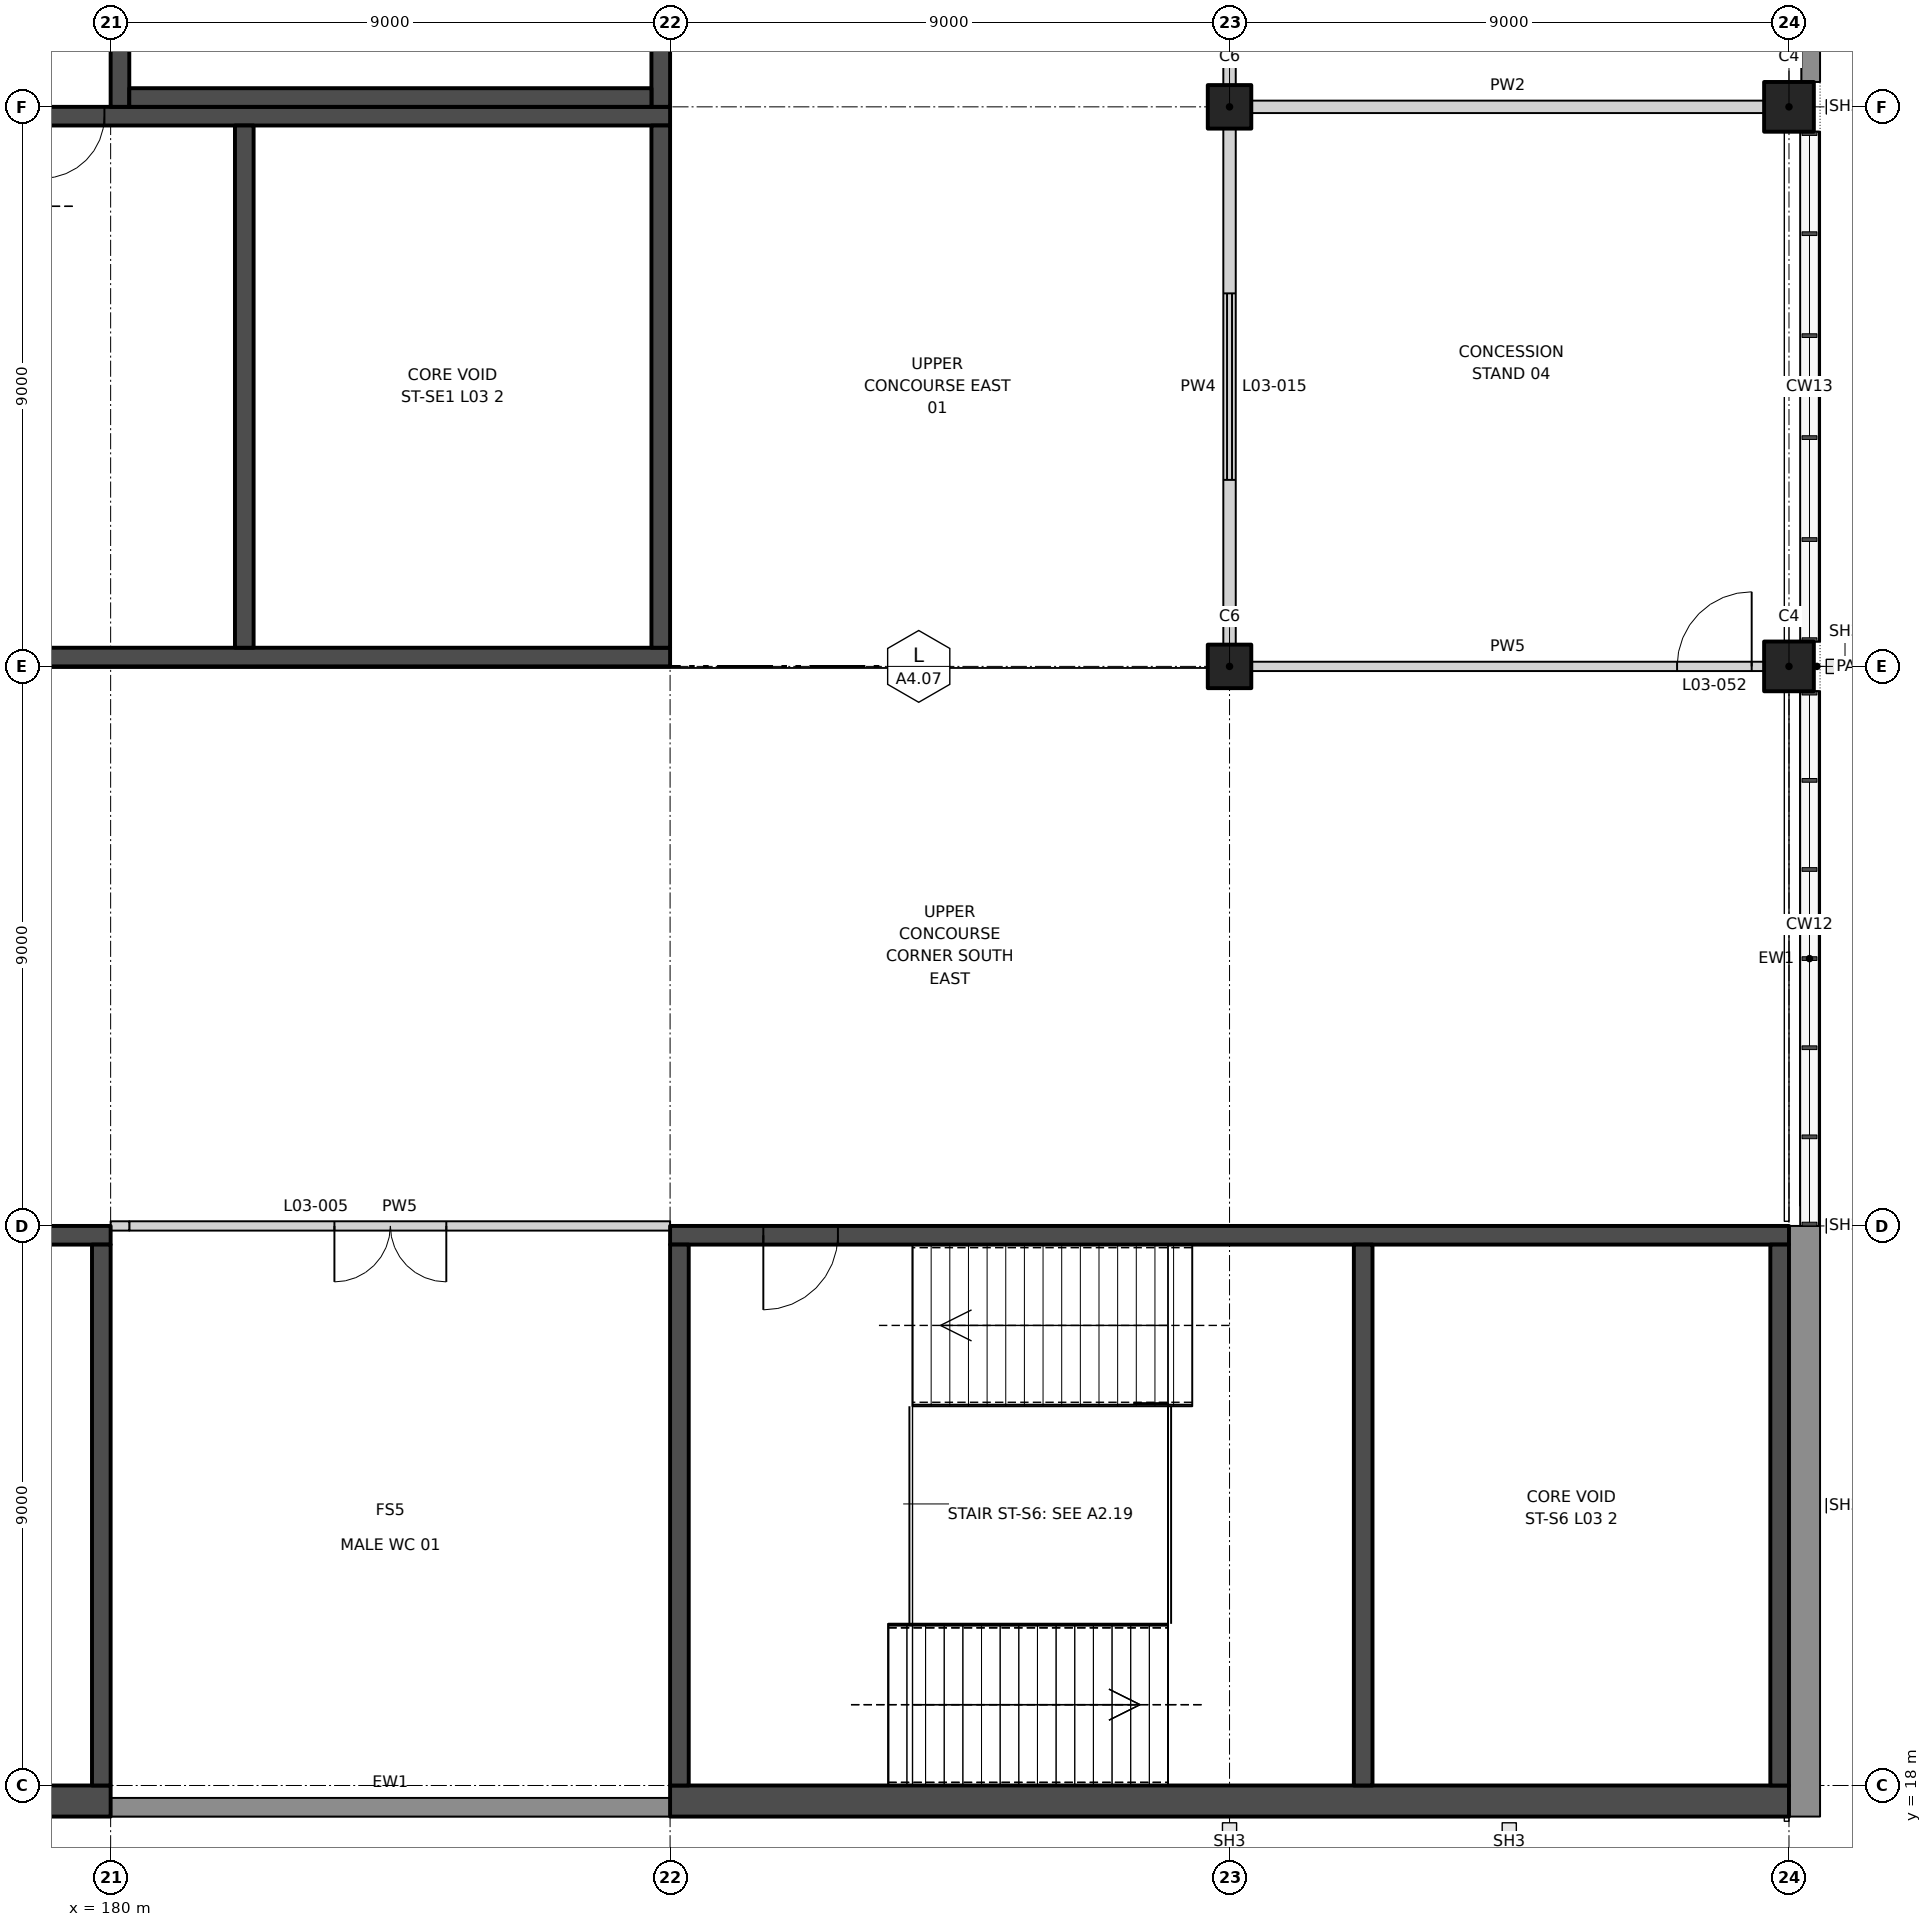
"""IFC4 building model, lengths in metres.
Left out: names, types, materials, properties, quantities, classifications, styles, units other than length and angle.
Written with IfcOpenShell. Run it as: python <this file> out.ifc"""

import sys

from ifc_helpers import new_model, si_unit, direction, frame, frame_2d, origin, origin_2d, place, context, subcontext, project, spatial, rectangle, extrude, element, fill, save


model = new_model("IFC4")
c1 = context("Model", 3, precision=1e-05, world=origin(), true_north=direction((0.0, 1.0)))
c2 = subcontext(c1, "Body", "Model", "MODEL_VIEW")
j1 = project(units=[si_unit("LENGTHUNIT", "METRE"), si_unit("PLANEANGLEUNIT", "RADIAN")], contexts=[c1])
p1 = place(None, origin())
s1 = spatial("IfcSite", under=j1, at=p1, CompositionType="ELEMENT")
p2 = place(p1, origin())
s2 = spatial("IfcBuilding", under=s1, at=p2, CompositionType="ELEMENT")
p3 = place(p2, frame((0.0, 0.0, 22.0)))
s3 = spatial("IfcBuildingStorey", under=s2, at=p3, CompositionType="ELEMENT", Elevation=22.0)
for number, where, z_axis, x_axis in (
    (1, (207.0, 36.0, 0.0), (0.0, 0.0, 1.0), (1.0, 0.0, 0.0)),
    (2, (207.0, 45.0, 0.0), (0.0, 0.0, 1.0), (1.0, 0.0, 0.0)),
):
    element("IfcColumn", number, at=place(p3, frame(where, z_axis=z_axis, x_axis=x_axis)), inside=s3, PredefinedType="COLUMN", context=c2, shape_type="SweptSolid", body=[
        extrude(rectangle(XDim=0.8, YDim=0.8, at=origin_2d()), origin(), (0.0, 0.0, 1.0), 6.0),
    ])
for number, where, z_axis, x_axis in (
    (3, (198.0, 36.0, 0.0), (0.0, 0.0, 1.0), (1.0, 0.0, 0.0)),
    (4, (198.0, 45.0, 0.0), (0.0, 0.0, 1.0), (1.0, 0.0, 0.0)),
):
    element("IfcColumn", number, at=place(p3, frame(where, z_axis=z_axis, x_axis=x_axis)), inside=s3, PredefinedType="COLUMN", context=c2, shape_type="SweptSolid", body=[
        extrude(rectangle(XDim=0.7, YDim=0.7, at=origin_2d()), origin(), (0.0, 0.0, 1.0), 6.0),
    ])
p4 = place(p3, frame((180.3, 27.0, 0.0), z_axis=(0.0, 0.0, 1.0), x_axis=(1.0, 0.0, 0.0)))
e5 = element("IfcWall", 5, at=p4, inside=s3, PredefinedType="PARTITIONING", context=c2, shape_type="SweptSolid", body=[
    extrude(rectangle(XDim=8.7, YDim=0.15, at=frame_2d((4.35, 0.0))), origin(), (0.0, 0.0, 1.0), 4.7),
])
p5 = place(p4, frame((3.3, 0.0, 0.0)))
e6 = element("IfcOpeningElement", 6, at=p5, cuts=e5, PredefinedType="OPENING", context=c2, shape_type="SweptSolid", body=[
    extrude(rectangle(XDim=1.8, YDim=2.1, at=frame_2d((0.9, 1.05))), frame((0.0, 0.085, 0.0), z_axis=(0.0, -1.0, 0.0), x_axis=(1.0, 0.0, 0.0)), (0.0, 0.0, 1.0), 0.17),
])
p6 = place(p3, frame((198.35, 36.0, 0.0), z_axis=(0.0, 0.0, 1.0), x_axis=(1.0, 0.0, 0.0)))
e7 = element("IfcWall", 7, at=p6, inside=s3, PredefinedType="PARTITIONING", context=c2, shape_type="SweptSolid", body=[
    extrude(rectangle(XDim=8.25, YDim=0.15, at=frame_2d((4.125, 0.0))), origin(), (0.0, 0.0, 1.0), 4.8),
])
p7 = place(p6, frame((6.85, 0.0, 0.0)))
e8 = element("IfcOpeningElement", 8, at=p7, cuts=e7, PredefinedType="OPENING", context=c2, shape_type="SweptSolid", body=[
    extrude(rectangle(XDim=1.2, YDim=2.1, at=frame_2d((0.6, 1.05))), frame((0.0, 0.085, 0.0), z_axis=(0.0, -1.0, 0.0), x_axis=(1.0, 0.0, 0.0)), (0.0, 0.0, 1.0), 0.17),
])
p8 = place(p3, frame((198.35, 45.0, 0.0), z_axis=(0.0, 0.0, 1.0), x_axis=(1.0, 0.0, 0.0)))
e9 = element("IfcWall", 9, at=p8, inside=s3, PredefinedType="PARTITIONING", context=c2, shape_type="SweptSolid", body=[
    extrude(rectangle(XDim=8.25, YDim=0.2, at=frame_2d((4.125, 0.0))), origin(), (0.0, 0.0, 1.0), 4.8),
])
p9 = place(p3, frame((198.0, 36.35, 0.0), z_axis=(0.0, 0.0, 1.0), x_axis=(0.0, 1.0, 0.0)))
e10 = element("IfcWall", 10, at=p9, inside=s3, PredefinedType="PARTITIONING", context=c2, shape_type="SweptSolid", body=[
    extrude(rectangle(XDim=8.3, YDim=0.2, at=frame_2d((4.15, 0.0))), origin(), (0.0, 0.0, 1.0), 4.8),
])
p10 = place(p9, frame((2.65, 0.0, 0.0)))
e11 = element("IfcOpeningElement", 11, at=p10, cuts=e10, PredefinedType="OPENING", context=c2, shape_type="SweptSolid", body=[
    extrude(rectangle(XDim=3.0, YDim=2.4, at=frame_2d((1.5, 1.2))), frame((0.0, 0.11, 0.0), z_axis=(0.0, -1.0, 0.0), x_axis=(1.0, 0.0, 0.0)), (0.0, 0.0, 1.0), 0.22),
])
p11 = place(p3, frame((198.0, 45.35, 0.0), z_axis=(0.0, 0.0, 1.0), x_axis=(0.0, 1.0, 0.0)))
e12 = element("IfcWall", 12, at=p11, inside=s3, PredefinedType="PARTITIONING", context=c2, shape_type="SweptSolid", body=[
    extrude(rectangle(XDim=8.65, YDim=0.2, at=frame_2d((4.325, 0.0))), origin(), (0.0, 0.0, 1.0), 4.7),
])
p12 = place(p11, frame((3.425, 0.0, 0.0)))
e13 = element("IfcOpeningElement", 13, at=p12, cuts=e12, PredefinedType="OPENING", context=c2, shape_type="SweptSolid", body=[
    extrude(rectangle(XDim=1.8, YDim=2.1, at=frame_2d((0.9, 1.05))), frame((0.0, 0.11, 0.0), z_axis=(0.0, -1.0, 0.0), x_axis=(1.0, 0.0, 0.0)), (0.0, 0.0, 1.0), 0.22),
])
p13 = place(p3, frame((180.0, 17.65, 0.0), z_axis=(0.0, 0.0, 1.0), x_axis=(1.0, 0.0, 0.0)))
e14 = element("IfcWall", 14, at=p13, inside=s3, PredefinedType="SOLIDWALL", context=c2, shape_type="SweptSolid", body=[
    extrude(rectangle(XDim=9.0, YDim=0.3, at=frame_2d((4.5, 0.0))), origin(), (0.0, 0.0, 1.0), 6.0),
])
p14 = place(p3, frame((207.25, 17.5, 0.0), z_axis=(0.0, 0.0, 1.0), x_axis=(0.0, 1.0, 0.0)))
e15 = element("IfcWall", 15, at=p14, inside=s3, PredefinedType="SOLIDWALL", context=c2, shape_type="SweptSolid", body=[
    extrude(rectangle(XDim=9.5, YDim=0.5, at=frame_2d((4.75, 0.0))), origin(), (0.0, 0.0, 1.0), 6.0),
])
p15 = place(p3, frame((207.35, 27.0, 0.0), z_axis=(0.0, 0.0, 1.0), x_axis=(0.0, 1.0, 0.0)))
e16 = element("IfcWall", 16, at=p15, inside=s3, PredefinedType="SOLIDWALL", context=c2, shape_type="SweptSolid", body=[
    extrude(rectangle(XDim=8.6, YDim=0.3, at=frame_2d((4.3, 0.0))), origin(), (0.0, 0.0, 1.0), 1.0),
])
p16 = place(p3, frame((207.35, 36.4, 0.0), z_axis=(0.0, 0.0, 1.0), x_axis=(0.0, 1.0, 0.0)))
e17 = element("IfcWall", 17, at=p16, inside=s3, PredefinedType="SOLIDWALL", context=c2, shape_type="SweptSolid", body=[
    extrude(rectangle(XDim=8.2, YDim=0.3, at=frame_2d((4.1, 0.0))), origin(), (0.0, 0.0, 1.0), 1.0),
])
p17 = place(p3, frame((207.35, 45.4, 0.0), z_axis=(0.0, 0.0, 1.0), x_axis=(0.0, 1.0, 0.0)))
e18 = element("IfcWall", 18, at=p17, inside=s3, PredefinedType="SOLIDWALL", context=c2, shape_type="SweptSolid", body=[
    extrude(rectangle(XDim=1.85, YDim=0.3, at=frame_2d((0.925, 0.0))), origin(), (0.0, 0.0, 1.0), 5.4),
])
p18 = place(p3, frame((180.0, 26.85, 0.0), z_axis=(0.0, 0.0, 1.0), x_axis=(-1.0, 0.0, 0.0)))
e19 = element("IfcWall", 19, at=p18, inside=s3, PredefinedType="SHEAR", context=c2, shape_type="SweptSolid", body=[
    extrude(rectangle(XDim=18.0, YDim=0.3, at=frame_2d((9.0, 0.0))), origin(), (0.0, 0.0, 1.0), 6.0),
])
p19 = place(p18, frame((1.5, 0.0, 0.0)))
e20 = element("IfcOpeningElement", 20, at=p19, cuts=e19, PredefinedType="OPENING", context=c2, shape_type="SweptSolid", body=[
    extrude(rectangle(XDim=1.2, YDim=2.1, at=frame_2d((0.6, 1.05))), frame((0.0, 0.16, 0.0), z_axis=(0.0, -1.0, 0.0), x_axis=(1.0, 0.0, 0.0)), (0.0, 0.0, 1.0), 0.32),
])
p20 = place(p3, frame((180.0, 17.75, 0.0), z_axis=(0.0, 0.0, 1.0), x_axis=(-1.0, 0.0, 0.0)))
e21 = element("IfcWall", 21, at=p20, inside=s3, PredefinedType="SHEAR", context=c2, shape_type="SweptSolid", body=[
    extrude(rectangle(XDim=18.0, YDim=0.5, at=frame_2d((9.0, 0.0))), origin(), (0.0, 0.0, 1.0), 6.0),
])
p21 = place(p3, frame((179.85, 26.7, 0.0), z_axis=(0.0, 0.0, 1.0), x_axis=(0.0, -1.0, 0.0)))
e22 = element("IfcWall", 22, at=p21, inside=s3, PredefinedType="SHEAR", context=c2, shape_type="SweptSolid", body=[
    extrude(rectangle(XDim=8.7, YDim=0.3, at=frame_2d((4.35, 0.0))), origin(), (0.0, 0.0, 1.0), 6.0),
])
p22 = place(p3, frame((189.0, 26.85, 0.0), z_axis=(0.0, 0.0, 1.0), x_axis=(1.0, 0.0, 0.0)))
e23 = element("IfcWall", 23, at=p22, inside=s3, PredefinedType="SHEAR", context=c2, shape_type="SweptSolid", body=[
    extrude(rectangle(XDim=18.0, YDim=0.3, at=frame_2d((9.0, 0.0))), origin(), (0.0, 0.0, 1.0), 6.0),
])
p23 = place(p22, frame((1.5, 0.0, 0.0)))
e24 = element("IfcOpeningElement", 24, at=p23, cuts=e23, PredefinedType="OPENING", context=c2, shape_type="SweptSolid", body=[
    extrude(rectangle(XDim=1.2, YDim=2.1, at=frame_2d((0.6, 1.05))), frame((0.0, 0.16, 0.0), z_axis=(0.0, -1.0, 0.0), x_axis=(1.0, 0.0, 0.0)), (0.0, 0.0, 1.0), 0.32),
])
p24 = place(p3, frame((189.0, 17.75, 0.0), z_axis=(0.0, 0.0, 1.0), x_axis=(1.0, 0.0, 0.0)))
e25 = element("IfcWall", 25, at=p24, inside=s3, PredefinedType="SHEAR", context=c2, shape_type="SweptSolid", body=[
    extrude(rectangle(XDim=18.0, YDim=0.5, at=frame_2d((9.0, 0.0))), origin(), (0.0, 0.0, 1.0), 6.0),
])
for number, where, z_axis, x_axis in (
    (26, (189.15, 26.7, 0.0), (0.0, 0.0, 1.0), (0.0, -1.0, 0.0)),
    (27, (206.85, 26.7, 0.0), (0.0, 0.0, 1.0), (0.0, -1.0, 0.0)),
    (28, (200.15, 26.7, 0.0), (0.0, 0.0, 1.0), (0.0, -1.0, 0.0)),
):
    element("IfcWall", number, at=place(p3, frame(where, z_axis=z_axis, x_axis=x_axis)), inside=s3, PredefinedType="SHEAR", context=c2, shape_type="SweptSolid", body=[
        extrude(rectangle(XDim=8.7, YDim=0.3, at=frame_2d((4.35, 0.0))), origin(), (0.0, 0.0, 1.0), 6.0),
    ])
p25 = place(p3, frame((170.75, 44.85, 0.0), z_axis=(0.0, 0.0, 1.0), x_axis=(1.0, 0.0, 0.0)))
e29 = element("IfcWall", 29, at=p25, inside=s3, PredefinedType="SHEAR", context=c2, shape_type="SweptSolid", body=[
    extrude(rectangle(XDim=18.25, YDim=0.3, at=frame_2d((9.125, 0.0))), origin(), (0.0, 0.0, 1.0), 6.0),
])
p26 = place(p25, frame((8.15, 0.0, 0.0)))
e30 = element("IfcOpeningElement", 30, at=p26, cuts=e29, PredefinedType="OPENING", context=c2, shape_type="SweptSolid", body=[
    extrude(rectangle(XDim=1.0, YDim=2.1, at=frame_2d((0.5, 1.05))), frame((0.0, 0.16, 0.0), z_axis=(0.0, -1.0, 0.0), x_axis=(1.0, 0.0, 0.0)), (0.0, 0.0, 1.0), 0.32),
])
p27 = place(p3, frame((171.0, 36.15, 0.0), z_axis=(0.0, 0.0, 1.0), x_axis=(1.0, 0.0, 0.0)))
e31 = element("IfcWall", 31, at=p27, inside=s3, PredefinedType="SHEAR", context=c2, shape_type="SweptSolid", body=[
    extrude(rectangle(XDim=18.0, YDim=0.3, at=frame_2d((9.0, 0.0))), origin(), (0.0, 0.0, 1.0), 6.0),
])
for number, where, z_axis, x_axis in (
    (32, (188.85, 44.7, 0.0), (0.0, 0.0, 1.0), (0.0, -1.0, 0.0)),
    (33, (182.15, 44.7, 0.0), (0.0, 0.0, 1.0), (0.0, -1.0, 0.0)),
):
    element("IfcWall", number, at=place(p3, frame(where, z_axis=z_axis, x_axis=x_axis)), inside=s3, PredefinedType="SHEAR", context=c2, shape_type="SweptSolid", body=[
        extrude(rectangle(XDim=8.4, YDim=0.3, at=frame_2d((4.2, 0.0))), origin(), (0.0, 0.0, 1.0), 6.0),
    ])
p28 = place(p3, frame((180.15, 63.0, 0.0), z_axis=(0.0, 0.0, 1.0), x_axis=(0.0, -1.0, 0.0)))
e34 = element("IfcWall", 34, at=p28, inside=s3, PredefinedType="SHEAR", context=c2, shape_type="SweptSolid", body=[
    extrude(rectangle(XDim=18.0, YDim=0.3, at=frame_2d((9.0, 0.0))), origin(), (0.0, 0.0, 1.0), 6.0),
])
p29 = place(p28, frame((8.6, 0.0, 0.0)))
e35 = element("IfcOpeningElement", 35, at=p29, cuts=e34, PredefinedType="OPENING", context=c2, shape_type="SweptSolid", body=[
    extrude(rectangle(XDim=1.2, YDim=2.1, at=frame_2d((0.6, 1.05))), frame((0.0, 0.16, 0.0), z_axis=(0.0, -1.0, 0.0), x_axis=(1.0, 0.0, 0.0)), (0.0, 0.0, 1.0), 0.32),
])
p30 = place(p3, frame((188.85, 63.0, 0.0), z_axis=(0.0, 0.0, 1.0), x_axis=(0.0, -1.0, 0.0)))
e36 = element("IfcWall", 36, at=p30, inside=s3, PredefinedType="SHEAR", context=c2, shape_type="SweptSolid", body=[
    extrude(rectangle(XDim=18.0, YDim=0.3, at=frame_2d((9.0, 0.0))), origin(), (0.0, 0.0, 1.0), 6.0),
])
p31 = place(p3, frame((180.3, 45.15, 0.0), z_axis=(0.0, 0.0, 1.0), x_axis=(1.0, 0.0, 0.0)))
e37 = element("IfcWall", 37, at=p31, inside=s3, PredefinedType="SHEAR", context=c2, shape_type="SweptSolid", body=[
    extrude(rectangle(XDim=8.4, YDim=0.3, at=frame_2d((4.2, 0.0))), origin(), (0.0, 0.0, 1.0), 6.0),
])
p32 = place(p3, frame((180.0, 27.0, 0.0), z_axis=(0.0, 0.0, 1.0), x_axis=(1.0, 0.0, 0.0)))
e38 = element("IfcWall", 38, at=p32, inside=s3, PredefinedType="PARTITIONING", context=c2, shape_type="SweptSolid", body=[
    extrude(rectangle(XDim=0.3, YDim=0.15, at=frame_2d((0.15, 0.0))), origin(), (0.0, 0.0, 1.0), 6.0),
])
p33 = place(p5, frame((1.8, 0.0, 0.0), z_axis=(0.0, 0.0, 1.0), x_axis=(-1.0, 0.0, 0.0)))
e39 = element("IfcDoor", 39, at=p33, inside=s3, OperationType="DOUBLE_DOOR_DOUBLE_SWING", PredefinedType="DOOR", context=c2, shape_type="SweptSolid", body=[
    extrude(rectangle(XDim=1.8, YDim=2.1, at=frame_2d((0.9, 1.05))), frame((0.0, 0.025, 0.0), z_axis=(0.0, -1.0, 0.0), x_axis=(1.0, 0.0, 0.0)), (0.0, 0.0, 1.0), 0.05),
])
fill(e6, e39)
p34 = place(p10, origin())
e40 = element("IfcDoor", 40, at=p34, inside=s3, OperationType="ROLLINGUP", PredefinedType="DOOR", context=c2, shape_type="SweptSolid", body=[
    extrude(rectangle(XDim=3.0, YDim=2.4, at=frame_2d((1.5, 1.2))), frame((0.0, 0.025, 0.0), z_axis=(0.0, -1.0, 0.0), x_axis=(1.0, 0.0, 0.0)), (0.0, 0.0, 1.0), 0.05),
])
fill(e11, e40)
p35 = place(p7, origin())
e41 = element("IfcDoor", 41, at=p35, inside=s3, OperationType="SINGLE_SWING_RIGHT", PredefinedType="DOOR", context=c2, shape_type="SweptSolid", body=[
    extrude(rectangle(XDim=1.2, YDim=2.1, at=frame_2d((0.6, 1.05))), frame((0.0, 0.025, 0.0), z_axis=(0.0, -1.0, 0.0), x_axis=(1.0, 0.0, 0.0)), (0.0, 0.0, 1.0), 0.05),
])
fill(e8, e41)
p36 = place(p23, frame((1.2, 0.0, 0.0), z_axis=(0.0, 0.0, 1.0), x_axis=(-1.0, 0.0, 0.0)))
e42 = element("IfcDoor", 42, at=p36, inside=s3, OperationType="SINGLE_SWING_RIGHT", PredefinedType="DOOR", context=c2, shape_type="SweptSolid", body=[
    extrude(rectangle(XDim=1.2, YDim=2.1, at=frame_2d((0.6, 1.05))), frame((0.0, 0.025, 0.0), z_axis=(0.0, -1.0, 0.0), x_axis=(1.0, 0.0, 0.0)), (0.0, 0.0, 1.0), 0.05),
])
fill(e24, e42)
p37 = place(p26, frame((1.0, 0.0, 0.0), z_axis=(0.0, 0.0, 1.0), x_axis=(-1.0, 0.0, 0.0)))
e43 = element("IfcDoor", 43, at=p37, inside=s3, OperationType="SINGLE_SWING_RIGHT", PredefinedType="DOOR", context=c2, shape_type="SweptSolid", body=[
    extrude(rectangle(XDim=1.0, YDim=2.1, at=frame_2d((0.5, 1.05))), frame((0.0, 0.025, 0.0), z_axis=(0.0, -1.0, 0.0), x_axis=(1.0, 0.0, 0.0)), (0.0, 0.0, 1.0), 0.05),
])
fill(e30, e43)
save(model, sys.argv[1])
